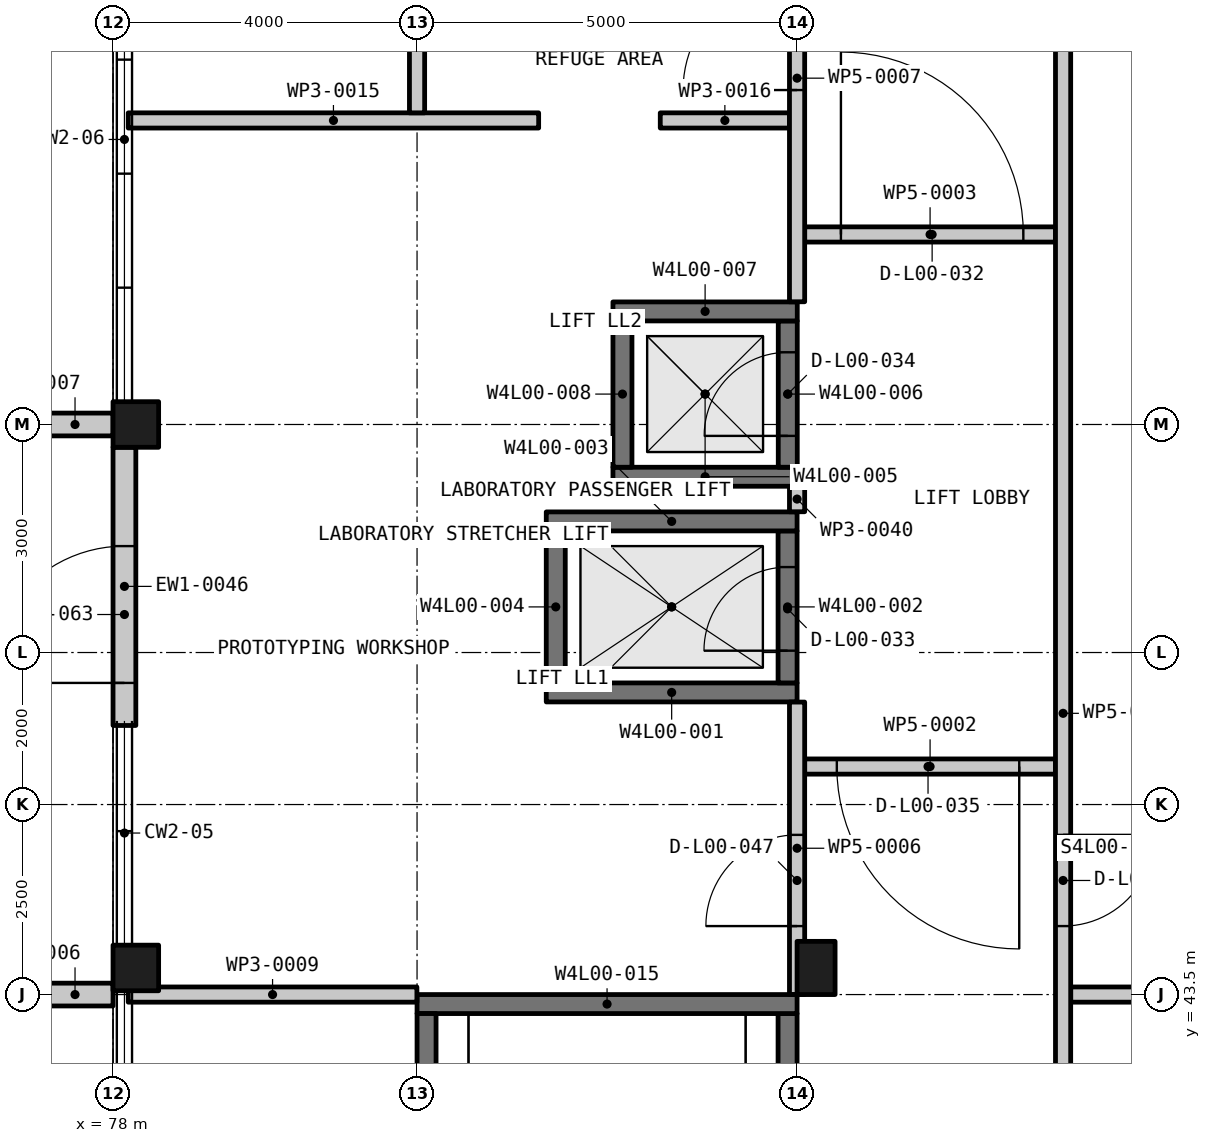
"""IFC4 building model, lengths in metres.
Left out: names, types, materials, properties, quantities, classifications, styles, units other than length and angle.
Written with IfcOpenShell. Run it as: python <this file> out.ifc"""

import sys

from ifc_helpers import new_model, si_unit, direction, frame, frame_2d, origin, origin_2d, place, context, subcontext, project, spatial, rectangle, extrude, element, fill, save


model = new_model("IFC4")
c1 = context("Model", 3, precision=1e-05, world=origin(), true_north=direction((0.0, 1.0)))
c2 = subcontext(c1, "Body", "Model", "MODEL_VIEW")
j1 = project(units=[si_unit("LENGTHUNIT", "METRE"), si_unit("PLANEANGLEUNIT", "RADIAN")], contexts=[c1])
p1 = place(None, origin())
s1 = spatial("IfcSite", under=j1, at=p1, CompositionType="ELEMENT")
p2 = place(p1, origin())
s2 = spatial("IfcBuilding", under=s1, at=p2, CompositionType="ELEMENT")
p3 = place(p2, origin())
s3 = spatial("IfcBuildingStorey", under=s2, at=p3, CompositionType="ELEMENT", Elevation=0.0)
for number, where, z_axis, x_axis in (
    (1, (78.3, 43.85, -0.2), (0.0, 0.0, 1.0), (1.0, 0.0, 0.0)),
    (2, (78.3, 51.0, -0.2), (0.0, 0.0, 1.0), (1.0, 0.0, 0.0)),
):
    element("IfcColumn", number, at=place(p3, frame(where, z_axis=z_axis, x_axis=x_axis)), inside=s3, PredefinedType="COLUMN", context=c2, shape_type="SweptSolid", body=[
        extrude(rectangle(XDim=0.6, YDim=0.6, at=origin_2d()), origin(), (0.0, 0.0, 1.0), 5.9),
    ])
p4 = place(p3, frame((87.25, 43.85, -0.2), z_axis=(0.0, 0.0, 1.0), x_axis=(1.0, 0.0, 0.0)))
e3 = element("IfcColumn", 3, at=p4, inside=s3, PredefinedType="COLUMN", context=c2, shape_type="SweptSolid", body=[
    extrude(rectangle(XDim=0.5, YDim=0.7, at=origin_2d()), origin(), (0.0, 0.0, 1.0), 5.9),
])
p5 = place(p3, frame((83.7, 47.475, -1.4), z_axis=(0.0, 0.0, 1.0), x_axis=(1.0, 0.0, 0.0)))
e4 = element("IfcWall", 4, at=p5, inside=s3, PredefinedType="SHEAR", context=c2, shape_type="SweptSolid", body=[
    extrude(rectangle(XDim=3.3, YDim=0.25, at=frame_2d((1.65, 0.0))), origin(), (0.0, 0.0, 1.0), 7.1),
])
p6 = place(p3, frame((86.875, 47.6, -1.4), z_axis=(0.0, 0.0, 1.0), x_axis=(0.0, 1.0, 0.0)))
e5 = element("IfcWall", 5, at=p6, inside=s3, PredefinedType="SHEAR", context=c2, shape_type="SweptSolid", body=[
    extrude(rectangle(XDim=2.0, YDim=0.25, at=frame_2d((1.0, 0.0))), origin(), (0.0, 0.0, 1.0), 7.1),
])
p7 = place(p6, frame((0.424, 0.0, 1.4)))
e6 = element("IfcOpeningElement", 6, at=p7, cuts=e5, PredefinedType="OPENING", context=c2, shape_type="SweptSolid", body=[
    extrude(rectangle(XDim=1.1, YDim=2.1, at=frame_2d((0.55, 1.05))), frame((0.0, 0.135, 0.0), z_axis=(0.0, -1.0, 0.0), x_axis=(1.0, 0.0, 0.0)), (0.0, 0.0, 1.0), 0.27),
])
p8 = place(p3, frame((83.7, 49.725, -1.4), z_axis=(0.0, 0.0, 1.0), x_axis=(1.0, 0.0, 0.0)))
e7 = element("IfcWall", 7, at=p8, inside=s3, PredefinedType="SHEAR", context=c2, shape_type="SweptSolid", body=[
    extrude(rectangle(XDim=3.3, YDim=0.25, at=frame_2d((1.65, 0.0))), origin(), (0.0, 0.0, 1.0), 7.1),
])
p9 = place(p3, frame((83.825, 47.6, -1.4), z_axis=(0.0, 0.0, 1.0), x_axis=(0.0, 1.0, 0.0)))
e8 = element("IfcWall", 8, at=p9, inside=s3, PredefinedType="SHEAR", context=c2, shape_type="SweptSolid", body=[
    extrude(rectangle(XDim=2.0, YDim=0.25, at=frame_2d((1.0, 0.0))), origin(), (0.0, 0.0, 1.0), 7.1),
])
p10 = place(p3, frame((84.577, 50.312, -1.4), z_axis=(0.0, 0.0, 1.0), x_axis=(1.0, 0.0, 0.0)))
e9 = element("IfcWall", 9, at=p10, inside=s3, PredefinedType="SHEAR", context=c2, shape_type="SweptSolid", body=[
    extrude(rectangle(XDim=2.425, YDim=0.25, at=frame_2d((1.212, 0.0))), origin(), (0.0, 0.0, 1.0), 7.1),
])
p11 = place(p3, frame((86.877, 50.438, -1.4), z_axis=(0.0, 0.0, 1.0), x_axis=(0.0, 1.0, 0.0)))
e10 = element("IfcWall", 10, at=p11, inside=s3, PredefinedType="SHEAR", context=c2, shape_type="SweptSolid", body=[
    extrude(rectangle(XDim=1.925, YDim=0.25, at=frame_2d((0.962, 0.0))), origin(), (0.0, 0.0, 1.0), 7.1),
])
p12 = place(p11, frame((0.413, 0.0, 1.4)))
e11 = element("IfcOpeningElement", 11, at=p12, cuts=e10, PredefinedType="OPENING", context=c2, shape_type="SweptSolid", body=[
    extrude(rectangle(XDim=1.1, YDim=2.1, at=frame_2d((0.55, 1.05))), frame((0.0, 0.135, 0.0), z_axis=(0.0, -1.0, 0.0), x_axis=(1.0, 0.0, 0.0)), (0.0, 0.0, 1.0), 0.27),
])
p13 = place(p3, frame((84.577, 52.488, -1.4), z_axis=(0.0, 0.0, 1.0), x_axis=(1.0, 0.0, 0.0)))
e12 = element("IfcWall", 12, at=p13, inside=s3, PredefinedType="SHEAR", context=c2, shape_type="SweptSolid", body=[
    extrude(rectangle(XDim=2.425, YDim=0.25, at=frame_2d((1.212, 0.0))), origin(), (0.0, 0.0, 1.0), 7.1),
])
p14 = place(p3, frame((84.702, 50.438, -1.4), z_axis=(0.0, 0.0, 1.0), x_axis=(0.0, 1.0, 0.0)))
e13 = element("IfcWall", 13, at=p14, inside=s3, PredefinedType="SHEAR", context=c2, shape_type="SweptSolid", body=[
    extrude(rectangle(XDim=1.925, YDim=0.25, at=frame_2d((0.962, 0.0))), origin(), (0.0, 0.0, 1.0), 7.1),
])
p15 = place(p3, frame((86.875, 36.25, -0.2), z_axis=(0.0, 0.0, 1.0), x_axis=(0.0, 1.0, 0.0)))
e14 = element("IfcWall", 14, at=p15, inside=s3, PredefinedType="SHEAR", context=c2, shape_type="SweptSolid", body=[
    extrude(rectangle(XDim=7.0, YDim=0.25, at=frame_2d((3.5, 0.0))), origin(), (0.0, 0.0, 1.0), 5.9),
])
p16 = place(p3, frame((82.0, 43.375, -0.2), z_axis=(0.0, 0.0, 1.0), x_axis=(1.0, 0.0, 0.0)))
e15 = element("IfcWall", 15, at=p16, inside=s3, PredefinedType="SHEAR", context=c2, shape_type="SweptSolid", body=[
    extrude(rectangle(XDim=5.0, YDim=0.25, at=frame_2d((2.5, 0.0))), origin(), (0.0, 0.0, 1.0), 5.9),
])
p17 = place(p3, frame((82.125, 36.25, -0.2), z_axis=(0.0, 0.0, 1.0), x_axis=(0.0, 1.0, 0.0)))
e16 = element("IfcWall", 16, at=p17, inside=s3, PredefinedType="SHEAR", context=c2, shape_type="SweptSolid", body=[
    extrude(rectangle(XDim=7.0, YDim=0.25, at=frame_2d((3.5, 0.0))), origin(), (0.0, 0.0, 1.0), 5.9),
])
p18 = place(p3, frame((78.15, 47.04, 0.0), z_axis=(0.0, 0.0, 1.0), x_axis=(0.0, 1.0, 0.0)))
e17 = element("IfcWall", 17, at=p18, inside=s3, PredefinedType="SOLIDWALL", context=c2, shape_type="SweptSolid", body=[
    extrude(rectangle(XDim=3.66, YDim=0.3, at=frame_2d((1.83, 0.0))), origin(), (0.0, 0.0, 1.0), 4.9),
])
p19 = place(p18, frame((0.56, 0.0, 0.0)))
e18 = element("IfcOpeningElement", 18, at=p19, cuts=e17, PredefinedType="OPENING", context=c2, shape_type="SweptSolid", body=[
    extrude(rectangle(XDim=1.8, YDim=2.2, at=frame_2d((0.9, 1.1))), frame((0.0, 0.16, 0.0), z_axis=(0.0, -1.0, 0.0), x_axis=(1.0, 0.0, 0.0)), (0.0, 0.0, 1.0), 0.32),
])
for number, where, z_axis, x_axis in (
    (19, (77.0, 43.5, 0.0), (0.0, 0.0, 1.0), (1.0, 0.0, 0.0)),
    (20, (77.0, 51.0, 0.0), (0.0, 0.0, 1.0), (1.0, 0.0, 0.0)),
):
    element("IfcWall", number, at=place(p3, frame(where, z_axis=z_axis, x_axis=x_axis)), inside=s3, PredefinedType="SOLIDWALL", context=c2, shape_type="SweptSolid", body=[
        extrude(rectangle(XDim=1.0, YDim=0.3, at=frame_2d((0.5, 0.0))), origin(), (0.0, 0.0, 1.0), 6.0),
    ])
p20 = place(p3, frame((78.2, 43.5, 0.0), z_axis=(0.0, 0.0, 1.0), x_axis=(1.0, 0.0, 0.0)))
e21 = element("IfcWall", 21, at=p20, inside=s3, PredefinedType="PARTITIONING", context=c2, shape_type="SweptSolid", body=[
    extrude(rectangle(XDim=3.798, YDim=0.2, at=frame_2d((1.899, 0.0))), origin(), (0.0, 0.0, 1.0), 4.9),
])
p21 = place(p3, frame((90.6, 43.5, 0.0), z_axis=(0.0, 0.0, 1.0), x_axis=(1.0, 0.0, 0.0)))
e22 = element("IfcWall", 22, at=p21, inside=s3, PredefinedType="PARTITIONING", context=c2, shape_type="SweptSolid", body=[
    extrude(rectangle(XDim=12.998, YDim=0.2, at=frame_2d((6.499, 0.0))), origin(), (0.0, 0.0, 1.0), 4.9),
])
p22 = place(p3, frame((90.4, 46.5, 0.0), z_axis=(0.0, 0.0, 1.0), x_axis=(-1.0, 0.0, 0.0)))
e23 = element("IfcWall", 23, at=p22, inside=s3, PredefinedType="PARTITIONING", context=c2, shape_type="SweptSolid", body=[
    extrude(rectangle(XDim=3.3, YDim=0.2, at=frame_2d((1.65, 0.0))), origin(), (0.0, 0.0, 1.0), 4.9),
])
p23 = place(p22, frame((0.477, 0.0, 0.0)))
e24 = element("IfcOpeningElement", 24, at=p23, cuts=e23, PredefinedType="OPENING", context=c2, shape_type="SweptSolid", body=[
    extrude(rectangle(XDim=2.4, YDim=2.1, at=frame_2d((1.2, 1.05))), frame((0.0, 0.11, 0.0), z_axis=(0.0, -1.0, 0.0), x_axis=(1.0, 0.0, 0.0)), (0.0, 0.0, 1.0), 0.22),
])
p24 = place(p3, frame((87.1, 53.5, 0.0), z_axis=(0.0, 0.0, 1.0), x_axis=(1.0, 0.0, 0.0)))
e25 = element("IfcWall", 25, at=p24, inside=s3, PredefinedType="PARTITIONING", context=c2, shape_type="SweptSolid", body=[
    extrude(rectangle(XDim=3.3, YDim=0.2, at=frame_2d((1.65, 0.0))), origin(), (0.0, 0.0, 1.0), 4.9),
])
p25 = place(p24, frame((0.477, 0.0, 0.0)))
e26 = element("IfcOpeningElement", 26, at=p25, cuts=e25, PredefinedType="OPENING", context=c2, shape_type="SweptSolid", body=[
    extrude(rectangle(XDim=2.4, YDim=2.1, at=frame_2d((1.2, 1.05))), frame((0.0, 0.11, 0.0), z_axis=(0.0, -1.0, 0.0), x_axis=(1.0, 0.0, 0.0)), (0.0, 0.0, 1.0), 0.22),
])
p26 = place(p3, frame((78.2, 55.0, 0.0), z_axis=(0.0, 0.0, 1.0), x_axis=(1.0, 0.0, 0.0)))
e27 = element("IfcWall", 27, at=p26, inside=s3, PredefinedType="PARTITIONING", context=c2, shape_type="SweptSolid", body=[
    extrude(rectangle(XDim=5.4, YDim=0.2, at=frame_2d((2.7, 0.0))), origin(), (0.0, 0.0, 1.0), 4.9),
])
p27 = place(p3, frame((85.2, 55.0, 0.0), z_axis=(0.0, 0.0, 1.0), x_axis=(1.0, 0.0, 0.0)))
e28 = element("IfcWall", 28, at=p27, inside=s3, PredefinedType="PARTITIONING", context=c2, shape_type="SweptSolid", body=[
    extrude(rectangle(XDim=1.7, YDim=0.2, at=frame_2d((0.85, 0.0))), origin(), (0.0, 0.0, 1.0), 5.1),
])
p28 = place(p3, frame((90.5, 80.8, 0.0), z_axis=(0.0, 0.0, 1.0), x_axis=(0.0, -1.0, 0.0)))
e29 = element("IfcWall", 29, at=p28, inside=s3, PredefinedType="PARTITIONING", context=c2, shape_type="SweptSolid", body=[
    extrude(rectangle(XDim=67.2, YDim=0.2, at=frame_2d((33.6, 0.0))), origin(), (0.0, 0.0, 1.0), 4.8),
])
p29 = place(p28, frame((59.2, 0.0, 0.0)))
e30 = element("IfcOpeningElement", 30, at=p29, cuts=e29, PredefinedType="OPENING", context=c2, shape_type="SweptSolid", body=[
    extrude(rectangle(XDim=1.2, YDim=2.1, at=frame_2d((0.6, 1.05))), frame((0.0, 0.11, 0.0), z_axis=(0.0, -1.0, 0.0), x_axis=(1.0, 0.0, 0.0)), (0.0, 0.0, 1.0), 0.22),
])
p30 = place(p28, frame((44.2, 0.0, 0.0)))
e31 = element("IfcOpeningElement", 31, at=p30, cuts=e29, PredefinedType="OPENING", context=c2, shape_type="SweptSolid", body=[
    extrude(rectangle(XDim=1.2, YDim=2.1, at=frame_2d((0.6, 1.05))), frame((0.0, 0.11, 0.0), z_axis=(0.0, -1.0, 0.0), x_axis=(1.0, 0.0, 0.0)), (0.0, 0.0, 1.0), 0.22),
])
p31 = place(p28, frame((35.199, 0.0, 0.0)))
e32 = element("IfcOpeningElement", 32, at=p31, cuts=e29, PredefinedType="OPENING", context=c2, shape_type="SweptSolid", body=[
    extrude(rectangle(XDim=1.2, YDim=2.1, at=frame_2d((0.6, 1.05))), frame((0.0, 0.11, 0.0), z_axis=(0.0, -1.0, 0.0), x_axis=(1.0, 0.0, 0.0)), (0.0, 0.0, 1.0), 0.22),
])
p32 = place(p28, frame((17.95, 0.0, 0.0)))
e33 = element("IfcOpeningElement", 33, at=p32, cuts=e29, PredefinedType="OPENING", context=c2, shape_type="SweptSolid", body=[
    extrude(rectangle(XDim=1.2, YDim=2.1, at=frame_2d((0.6, 1.05))), frame((0.0, 0.11, 0.0), z_axis=(0.0, -1.0, 0.0), x_axis=(1.0, 0.0, 0.0)), (0.0, 0.0, 1.0), 0.22),
])
p33 = place(p28, frame((6.825, 0.0, 0.0)))
e34 = element("IfcOpeningElement", 34, at=p33, cuts=e29, PredefinedType="OPENING", context=c2, shape_type="SweptSolid", body=[
    extrude(rectangle(XDim=1.2, YDim=2.1, at=frame_2d((0.6, 1.05))), frame((0.0, 0.11, 0.0), z_axis=(0.0, -1.0, 0.0), x_axis=(1.0, 0.0, 0.0)), (0.0, 0.0, 1.0), 0.22),
])
p34 = place(p3, frame((87.0, 43.502, 0.0), z_axis=(0.0, 0.0, 1.0), x_axis=(0.0, 1.0, 0.0)))
e35 = element("IfcWall", 35, at=p34, inside=s3, PredefinedType="PARTITIONING", context=c2, shape_type="SweptSolid", body=[
    extrude(rectangle(XDim=3.846, YDim=0.2, at=frame_2d((1.923, 0.0))), origin(), (0.0, 0.0, 1.0), 4.9),
])
p35 = place(p34, frame((0.899, 0.0, 0.0)))
e36 = element("IfcOpeningElement", 36, at=p35, cuts=e35, PredefinedType="OPENING", context=c2, shape_type="SweptSolid", body=[
    extrude(rectangle(XDim=1.2, YDim=2.1, at=frame_2d((0.6, 1.05))), frame((0.0, 0.11, 0.0), z_axis=(0.0, -1.0, 0.0), x_axis=(1.0, 0.0, 0.0)), (0.0, 0.0, 1.0), 0.22),
])
p36 = place(p3, frame((87.0, 49.852, 0.0), z_axis=(0.0, 0.0, 1.0), x_axis=(0.0, 1.0, 0.0)))
e37 = element("IfcWall", 37, at=p36, inside=s3, PredefinedType="PARTITIONING", context=c2, shape_type="SweptSolid", body=[
    extrude(rectangle(XDim=0.333, YDim=0.2, at=frame_2d((0.167, 0.0))), origin(), (0.0, 0.0, 1.0), 4.9),
])
p37 = place(p3, frame((87.0, 52.615, 0.0), z_axis=(0.0, 0.0, 1.0), x_axis=(0.0, 1.0, 0.0)))
e38 = element("IfcWall", 38, at=p37, inside=s3, PredefinedType="PARTITIONING", context=c2, shape_type="SweptSolid", body=[
    extrude(rectangle(XDim=5.884, YDim=0.2, at=frame_2d((2.942, 0.0))), origin(), (0.0, 0.0, 1.0), 4.9),
])
p38 = place(p37, frame((2.785, 0.0, 0.0)))
e39 = element("IfcOpeningElement", 39, at=p38, cuts=e38, PredefinedType="OPENING", context=c2, shape_type="SweptSolid", body=[
    extrude(rectangle(XDim=1.5, YDim=2.1, at=frame_2d((0.75, 1.05))), frame((0.0, 0.11, 0.0), z_axis=(0.0, -1.0, 0.0), x_axis=(1.0, 0.0, 0.0)), (0.0, 0.0, 1.0), 0.22),
])
p39 = place(p3, frame((82.0, 55.1, 0.0), z_axis=(0.0, 0.0, 1.0), x_axis=(0.0, 1.0, 0.0)))
e40 = element("IfcWall", 40, at=p39, inside=s3, PredefinedType="PARTITIONING", context=c2, shape_type="SweptSolid", body=[
    extrude(rectangle(XDim=3.398, YDim=0.2, at=frame_2d((1.699, 0.0))), origin(), (0.0, 0.0, 1.0), 4.9),
])
p40 = place(p39, frame((1.051, 0.0, 0.0)))
e41 = element("IfcOpeningElement", 41, at=p40, cuts=e40, PredefinedType="OPENING", context=c2, shape_type="SweptSolid", body=[
    extrude(rectangle(XDim=1.2, YDim=2.1, at=frame_2d((0.6, 1.05))), frame((0.0, 0.11, 0.0), z_axis=(0.0, -1.0, 0.0), x_axis=(1.0, 0.0, 0.0)), (0.0, 0.0, 1.0), 0.22),
])
p41 = place(p19, origin())
e42 = element("IfcDoor", 42, at=p41, inside=s3, OperationType="SINGLE_SWING_LEFT", PredefinedType="DOOR", context=c2, shape_type="SweptSolid", body=[
    extrude(rectangle(XDim=1.8, YDim=2.2, at=frame_2d((0.9, 1.1))), frame((0.0, 0.025, 0.0), z_axis=(0.0, -1.0, 0.0), x_axis=(1.0, 0.0, 0.0)), (0.0, 0.0, 1.0), 0.05),
])
fill(e18, e42)
p42 = place(p25, origin())
e43 = element("IfcDoor", 43, at=p42, inside=s3, OperationType="DOUBLE_DOOR_SINGLE_SWING", PredefinedType="DOOR", context=c2, shape_type="SweptSolid", body=[
    extrude(rectangle(XDim=2.4, YDim=2.1, at=frame_2d((1.2, 1.05))), frame((0.0, 0.025, 0.0), z_axis=(0.0, -1.0, 0.0), x_axis=(1.0, 0.0, 0.0)), (0.0, 0.0, 1.0), 0.05),
])
fill(e26, e43)
p43 = place(p7, origin())
e44 = element("IfcDoor", 44, at=p43, inside=s3, OperationType="DOUBLE_DOOR_SLIDING", PredefinedType="DOOR", context=c2, shape_type="SweptSolid", body=[
    extrude(rectangle(XDim=1.1, YDim=2.1, at=frame_2d((0.55, 1.05))), frame((0.0, 0.025, 0.0), z_axis=(0.0, -1.0, 0.0), x_axis=(1.0, 0.0, 0.0)), (0.0, 0.0, 1.0), 0.05),
])
fill(e6, e44)
p44 = place(p12, origin())
e45 = element("IfcDoor", 45, at=p44, inside=s3, OperationType="DOUBLE_DOOR_SLIDING", PredefinedType="DOOR", context=c2, shape_type="SweptSolid", body=[
    extrude(rectangle(XDim=1.1, YDim=2.1, at=frame_2d((0.55, 1.05))), frame((0.0, 0.025, 0.0), z_axis=(0.0, -1.0, 0.0), x_axis=(1.0, 0.0, 0.0)), (0.0, 0.0, 1.0), 0.05),
])
fill(e11, e45)
p45 = place(p23, origin())
e46 = element("IfcDoor", 46, at=p45, inside=s3, OperationType="DOUBLE_DOOR_SINGLE_SWING", PredefinedType="DOOR", context=c2, shape_type="SweptSolid", body=[
    extrude(rectangle(XDim=2.4, YDim=2.1, at=frame_2d((1.2, 1.05))), frame((0.0, 0.025, 0.0), z_axis=(0.0, -1.0, 0.0), x_axis=(1.0, 0.0, 0.0)), (0.0, 0.0, 1.0), 0.05),
])
fill(e24, e46)
p46 = place(p38, origin())
e47 = element("IfcDoor", 47, at=p46, inside=s3, OperationType="DOUBLE_DOOR_SINGLE_SWING", PredefinedType="DOOR", context=c2, shape_type="SweptSolid", body=[
    extrude(rectangle(XDim=1.5, YDim=2.1, at=frame_2d((0.75, 1.05))), frame((0.0, 0.025, 0.0), z_axis=(0.0, -1.0, 0.0), x_axis=(1.0, 0.0, 0.0)), (0.0, 0.0, 1.0), 0.05),
])
fill(e39, e47)
p47 = place(p35, origin())
e48 = element("IfcDoor", 48, at=p47, inside=s3, OperationType="SINGLE_SWING_RIGHT", PredefinedType="DOOR", context=c2, shape_type="SweptSolid", body=[
    extrude(rectangle(XDim=1.2, YDim=2.1, at=frame_2d((0.6, 1.05))), frame((0.0, 0.025, 0.0), z_axis=(0.0, -1.0, 0.0), x_axis=(1.0, 0.0, 0.0)), (0.0, 0.0, 1.0), 0.05),
])
fill(e36, e48)
p48 = place(p31, origin())
e49 = element("IfcDoor", 49, at=p48, inside=s3, OperationType="SINGLE_SWING_LEFT", PredefinedType="DOOR", context=c2, shape_type="SweptSolid", body=[
    extrude(rectangle(XDim=1.2, YDim=2.1, at=frame_2d((0.6, 1.05))), frame((0.0, 0.025, 0.0), z_axis=(0.0, -1.0, 0.0), x_axis=(1.0, 0.0, 0.0)), (0.0, 0.0, 1.0), 0.05),
])
fill(e32, e49)
save(model, sys.argv[1])
